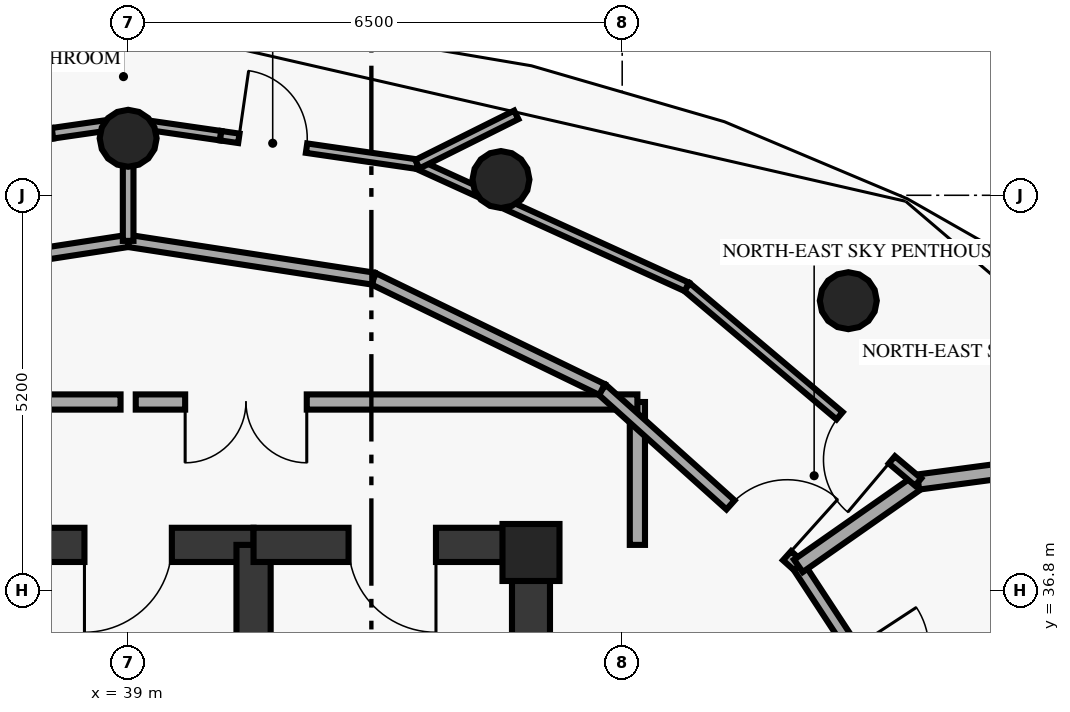
"""IFC4 building model, lengths in metres.
Left out: names, types, materials, properties, quantities, classifications, styles, units other than length and angle.
Written with IfcOpenShell. Run it as: python <this file> out.ifc"""

import sys

from ifc_helpers import new_model, si_unit, direction, frame, frame_2d, origin, origin_2d, place, context, subcontext, project, spatial, rectangle, circle, extrude, element, fill, save


model = new_model("IFC4")
c1 = context("Model", 3, precision=1e-05, world=origin(), true_north=direction((0.0, 1.0)))
c2 = subcontext(c1, "Body", "Model", "MODEL_VIEW")
j1 = project(units=[si_unit("LENGTHUNIT", "METRE"), si_unit("PLANEANGLEUNIT", "RADIAN")], contexts=[c1])
p1 = place(None, origin())
s1 = spatial("IfcSite", under=j1, at=p1, CompositionType="ELEMENT")
p2 = place(p1, origin())
s2 = spatial("IfcBuilding", under=s1, at=p2, CompositionType="ELEMENT")
p3 = place(p2, frame((0.0, 0.0, 255.6)))
s3 = spatial("IfcBuildingStorey", under=s2, at=p3, CompositionType="ELEMENT", Elevation=255.6)
p4 = place(p3, frame((44.3, 37.3, 0.0), z_axis=(0.0, 0.0, 1.0), x_axis=(1.0, 0.0, 0.0)))
e1 = element("IfcColumn", 1, at=p4, inside=s3, PredefinedType="PILASTER", context=c2, shape_type="SweptSolid", body=[
    extrude(rectangle(XDim=0.75, YDim=0.75, at=origin_2d()), origin(), (0.0, 0.0, 1.0), 3.54),
])
for number, where, z_axis, x_axis in (
    (2, (48.475, 40.613, 0.0), (0.0, 0.0, 1.0), (1.0, 0.0, 0.0)),
    (3, (43.905, 42.207, 0.0), (0.0, 0.0, 1.0), (1.0, 0.0, 0.0)),
    (4, (39.0, 42.75, 0.0), (0.0, 0.0, 1.0), (1.0, 0.0, 0.0)),
):
    element("IfcColumn", number, at=place(p3, frame(where, z_axis=z_axis, x_axis=x_axis)), inside=s3, PredefinedType="COLUMN", context=c2, shape_type="SweptSolid", body=[
        extrude(circle(Radius=0.375, at=origin_2d()), origin(), (0.0, 0.0, 1.0), 3.54),
    ])
p5 = place(p3, frame((44.3, 29.05, 0.0), z_axis=(0.0, 0.0, 1.0), x_axis=(0.0, 1.0, 0.0)))
e5 = element("IfcWall", 5, at=p5, inside=s3, PredefinedType="SHEAR", context=c2, shape_type="SweptSolid", body=[
    extrude(rectangle(XDim=8.35, YDim=0.5, at=frame_2d((4.175, 0.0))), origin(), (0.0, 0.0, 1.0), 3.54),
])
p6 = place(p3, frame((40.65, 37.4, 0.0), z_axis=(0.0, 0.0, 1.0), x_axis=(-1.0, 0.0, 0.0)))
e6 = element("IfcWall", 6, at=p6, inside=s3, PredefinedType="SHEAR", context=c2, shape_type="SweptSolid", body=[
    extrude(rectangle(XDim=3.3, YDim=0.45, at=frame_2d((1.65, 0.0))), origin(), (0.0, 0.0, 1.0), 3.54),
])
p7 = place(p6, frame((1.075, 0.0, 0.0)))
e7 = element("IfcOpeningElement", 7, at=p7, cuts=e6, PredefinedType="OPENING", context=c2, shape_type="SweptSolid", body=[
    extrude(rectangle(XDim=1.15, YDim=2.15, at=frame_2d((0.575, 1.075))), frame((0.0, 0.235, 0.0), z_axis=(0.0, -1.0, 0.0), x_axis=(1.0, 0.0, 0.0)), (0.0, 0.0, 1.0), 0.47),
])
p8 = place(p3, frame((40.65, 29.05, 0.0), z_axis=(0.0, 0.0, 1.0), x_axis=(0.0, 1.0, 0.0)))
e8 = element("IfcWall", 8, at=p8, inside=s3, PredefinedType="SHEAR", context=c2, shape_type="SweptSolid", body=[
    extrude(rectangle(XDim=8.35, YDim=0.45, at=frame_2d((4.175, 0.0))), origin(), (0.0, 0.0, 1.0), 3.54),
])
p9 = place(p3, frame((44.3, 37.4, 0.0), z_axis=(0.0, 0.0, 1.0), x_axis=(-1.0, 0.0, 0.0)))
e9 = element("IfcWall", 9, at=p9, inside=s3, PredefinedType="SHEAR", context=c2, shape_type="SweptSolid", body=[
    extrude(rectangle(XDim=3.65, YDim=0.45, at=frame_2d((1.825, 0.0))), origin(), (0.0, 0.0, 1.0), 3.54),
])
p10 = place(p9, frame((1.25, 0.0, 0.0)))
e10 = element("IfcOpeningElement", 10, at=p10, cuts=e9, PredefinedType="OPENING", context=c2, shape_type="SweptSolid", body=[
    extrude(rectangle(XDim=1.15, YDim=2.15, at=frame_2d((0.575, 1.075))), frame((0.0, 0.235, 0.0), z_axis=(0.0, -1.0, 0.0), x_axis=(1.0, 0.0, 0.0)), (0.0, 0.0, 1.0), 0.47),
])
p11 = place(p3, frame((45.7, 37.4, 0.0), z_axis=(0.0, 0.0, 1.0), x_axis=(0.0, 1.0, 0.0)))
e11 = element("IfcWall", 11, at=p11, inside=s3, PredefinedType="SOLIDWALL", context=c2, shape_type="SweptSolid", body=[
    extrude(rectangle(XDim=1.88, YDim=0.2, at=frame_2d((0.94, 0.0))), origin(), (0.0, 0.0, 1.0), 3.54),
])
p12 = place(p3, frame((38.9, 39.28, 0.0), z_axis=(0.0, 0.0, 1.0), x_axis=(-1.0, 0.0, 0.0)))
e12 = element("IfcWall", 12, at=p12, inside=s3, PredefinedType="SOLIDWALL", context=c2, shape_type="SweptSolid", body=[
    extrude(rectangle(XDim=5.2, YDim=0.2, at=frame_2d((2.6, 0.0))), origin(), (0.0, 0.0, 1.0), 3.54),
])
p13 = place(p12, frame((1.216, 0.0, 0.0)))
e13 = element("IfcOpeningElement", 13, at=p13, cuts=e12, PredefinedType="OPENING", context=c2, shape_type="SweptSolid", body=[
    extrude(rectangle(XDim=1.6, YDim=2.2, at=frame_2d((0.8, 1.1))), frame((0.0, 0.11, 0.0), z_axis=(0.0, -1.0, 0.0), x_axis=(1.0, 0.0, 0.0)), (0.0, 0.0, 1.0), 0.22),
])
p14 = place(p3, frame((45.7, 39.28, 0.0), z_axis=(0.0, 0.0, 1.0), x_axis=(-1.0, 0.0, 0.0)))
e14 = element("IfcWall", 14, at=p14, inside=s3, PredefinedType="SOLIDWALL", context=c2, shape_type="SweptSolid", body=[
    extrude(rectangle(XDim=6.6, YDim=0.2, at=frame_2d((3.3, 0.0))), origin(), (0.0, 0.0, 1.0), 3.54),
])
p15 = place(p14, frame((4.35, 0.0, 0.0)))
e15 = element("IfcOpeningElement", 15, at=p15, cuts=e14, PredefinedType="OPENING", context=c2, shape_type="SweptSolid", body=[
    extrude(rectangle(XDim=1.6, YDim=2.2, at=frame_2d((0.8, 1.1))), frame((0.0, 0.11, 0.0), z_axis=(0.0, -1.0, 0.0), x_axis=(1.0, 0.0, 0.0)), (0.0, 0.0, 1.0), 0.22),
])
p16 = place(p3, frame((47.818, 37.124, 0.0), z_axis=(0.0, 0.0, 1.0), x_axis=(0.547980633713, -0.836491019124, 0.0)))
e16 = element("IfcWall", 16, at=p16, inside=s3, PredefinedType="PARTITIONING", context=c2, shape_type="SweptSolid", body=[
    extrude(rectangle(XDim=3.615, YDim=0.16, at=frame_2d((1.808, 0.0))), origin(), (0.0, 0.0, 1.0), 3.54),
])
p17 = place(p16, frame((1.308, 0.0, 0.0)))
e17 = element("IfcOpeningElement", 17, at=p17, cuts=e16, PredefinedType="OPENING", context=c2, shape_type="SweptSolid", body=[
    extrude(rectangle(XDim=1.0, YDim=2.15, at=frame_2d((0.5, 1.075))), frame((0.0, 0.09, 0.0), z_axis=(0.0, -1.0, 0.0), x_axis=(1.0, 0.0, 0.0)), (0.0, 0.0, 1.0), 0.18),
])
p18 = place(p3, frame((45.235, 39.444, 0.0), z_axis=(0.0, 0.0, 1.0), x_axis=(0.743958104357, -0.668226263299, 0.0)))
e18 = element("IfcWall", 18, at=p18, inside=s3, PredefinedType="PARTITIONING", context=c2, shape_type="SweptSolid", body=[
    extrude(rectangle(XDim=3.472, YDim=0.16, at=frame_2d((1.736, 0.0))), origin(), (0.0, 0.0, 1.0), 3.54),
])
p19 = place(p18, frame((2.272, 0.0, 0.0)))
e19 = element("IfcOpeningElement", 19, at=p19, cuts=e18, PredefinedType="OPENING", context=c2, shape_type="SweptSolid", body=[
    extrude(rectangle(XDim=1.0, YDim=2.15, at=frame_2d((0.5, 1.075))), frame((0.0, 0.09, 0.0), z_axis=(0.0, -1.0, 0.0), x_axis=(1.0, 0.0, 0.0)), (0.0, 0.0, 1.0), 0.18),
])
p20 = place(p3, frame((45.235, 39.444, 0.0), z_axis=(0.0, 0.0, 1.0), x_axis=(-0.899751550897, 0.436402505329, 0.0)))
e20 = element("IfcWall", 20, at=p20, inside=s3, PredefinedType="PARTITIONING", context=c2, shape_type="SweptSolid", body=[
    extrude(rectangle(XDim=3.343, YDim=0.16, at=frame_2d((1.672, 0.0))), origin(), (0.0, 0.0, 1.0), 3.54),
])
for number, where, z_axis, x_axis in (
    (21, (42.227, 40.903, 0.0), (0.0, 0.0, 1.0), (-0.988, 0.152, 0.0)),
    (22, (39.0, 41.4, 0.0), (0.0, 0.0, 1.0), (-0.988, -0.152, 0.0)),
):
    element("IfcWall", number, at=place(p3, frame(where, z_axis=z_axis, x_axis=x_axis)), inside=s3, PredefinedType="PARTITIONING", context=c2, shape_type="SweptSolid", body=[
        extrude(rectangle(XDim=3.265, YDim=0.16, at=frame_2d((1.633, 0.0))), origin(), (0.0, 0.0, 1.0), 3.54),
    ])
p21 = place(p3, frame((47.818, 37.124, 0.0), z_axis=(0.0, 0.0, 1.0), x_axis=(0.819261732585, 0.573419753341, 0.0)))
e23 = element("IfcWall", 23, at=p21, inside=s3, PredefinedType="PARTITIONING", context=c2, shape_type="SweptSolid", body=[
    extrude(rectangle(XDim=1.924, YDim=0.2, at=frame_2d((0.962, 0.0))), origin(), (0.0, 0.0, 1.0), 3.54),
])
p22 = place(p3, frame((49.394, 38.227, 0.0), z_axis=(0.0, 0.0, 1.0), x_axis=(0.991241562349, 0.13206121714, 0.0)))
e24 = element("IfcWall", 24, at=p22, inside=s3, PredefinedType="PARTITIONING", context=c2, shape_type="SweptSolid", body=[
    extrude(rectangle(XDim=3.588, YDim=0.2, at=frame_2d((1.794, 0.0))), origin(), (0.0, 0.0, 1.0), 3.54),
])
p23 = place(p3, frame((46.35, 40.795, 0.0), z_axis=(0.0, 0.0, 1.0), x_axis=(0.764348134159, -0.644803791713, 0.0)))
e25 = element("IfcWall", 25, at=p23, inside=s3, PredefinedType="PARTITIONING", context=c2, shape_type="SweptSolid", body=[
    extrude(rectangle(XDim=3.982, YDim=0.125, at=frame_2d((1.991, 0.0))), origin(), (0.0, 0.0, 1.0), 3.54),
])
p24 = place(p23, frame((2.63, 0.0, 0.0)))
e26 = element("IfcOpeningElement", 26, at=p24, cuts=e25, PredefinedType="OPENING", context=c2, shape_type="SweptSolid", body=[
    extrude(rectangle(XDim=0.9, YDim=2.1, at=frame_2d((0.45, 1.05))), frame((0.0, 0.073, 0.0), z_axis=(0.0, -1.0, 0.0), x_axis=(1.0, 0.0, 0.0)), (0.0, 0.0, 1.0), 0.145),
])
p25 = place(p3, frame((46.35, 40.795, 0.0), z_axis=(0.0, 0.0, 1.0), x_axis=(-0.910117326054, 0.414350639938, 0.0)))
e27 = element("IfcWall", 27, at=p25, inside=s3, PredefinedType="PARTITIONING", context=c2, shape_type="SweptSolid", body=[
    extrude(rectangle(XDim=3.895, YDim=0.125, at=frame_2d((1.948, 0.0))), origin(), (0.0, 0.0, 1.0), 3.54),
])
p26 = place(p3, frame((39.0, 42.96, 0.0), z_axis=(0.0, 0.0, 1.0), x_axis=(0.989701809114, -0.143144434177, 0.0)))
e28 = element("IfcWall", 28, at=p26, inside=s3, PredefinedType="PARTITIONING", context=c2, shape_type="SweptSolid", body=[
    extrude(rectangle(XDim=1.23, YDim=0.125, at=frame_2d((0.615, 0.0))), origin(), (0.0, 0.0, 1.0), 3.54),
])
p27 = place(p3, frame((40.217, 42.784, 0.0), z_axis=(0.0, 0.0, 1.0), x_axis=(0.989663671869, -0.143407867924, 0.0)))
e29 = element("IfcWall", 29, at=p27, inside=s3, PredefinedType="PARTITIONING", context=c2, shape_type="SweptSolid", body=[
    extrude(rectangle(XDim=2.615, YDim=0.125, at=frame_2d((1.308, 0.0))), origin(), (0.0, 0.0, 1.0), 3.0),
])
p28 = place(p27, frame((0.242, 0.0, 0.0)))
e30 = element("IfcOpeningElement", 30, at=p28, cuts=e29, PredefinedType="OPENING", context=c2, shape_type="SweptSolid", body=[
    extrude(rectangle(XDim=0.9, YDim=2.1, at=frame_2d((0.45, 1.05))), frame((0.0, 0.073, 0.0), z_axis=(0.0, -1.0, 0.0), x_axis=(1.0, 0.0, 0.0)), (0.0, 0.0, 1.0), 0.145),
])
p29 = place(p3, frame((34.933, 42.371, 0.0), z_axis=(0.0, 0.0, 1.0), x_axis=(0.98967063222, 0.143359826038, 0.0)))
e31 = element("IfcWall", 31, at=p29, inside=s3, PredefinedType="PARTITIONING", context=c2, shape_type="SweptSolid", body=[
    extrude(rectangle(XDim=3.103, YDim=0.14, at=frame_2d((1.551, 0.0))), origin(), (0.0, 0.0, 1.0), 3.0),
])
p30 = place(p29, frame((1.762, 0.0, 0.0)))
e32 = element("IfcOpeningElement", 32, at=p30, cuts=e31, PredefinedType="OPENING", context=c2, shape_type="SweptSolid", body=[
    extrude(rectangle(XDim=0.85, YDim=2.1, at=frame_2d((0.425, 1.05))), frame((0.0, 0.08, 0.0), z_axis=(0.0, -1.0, 0.0), x_axis=(1.0, 0.0, 0.0)), (0.0, 0.0, 1.0), 0.16),
])
p31 = place(p3, frame((38.004, 42.816, 0.0), z_axis=(0.0, 0.0, 1.0), x_axis=(0.989705462513, 0.143119172275, 0.0)))
e33 = element("IfcWall", 33, at=p31, inside=s3, PredefinedType="PARTITIONING", context=c2, shape_type="SweptSolid", body=[
    extrude(rectangle(XDim=1.006, YDim=0.14, at=frame_2d((0.503, 0.0))), origin(), (0.0, 0.0, 1.0), 3.54),
])
p32 = place(p3, frame((39.0, 41.4, 0.0), z_axis=(0.0, 0.0, 1.0), x_axis=(0.0, 1.0, 0.0)))
e34 = element("IfcWall", 34, at=p32, inside=s3, PredefinedType="PARTITIONING", context=c2, shape_type="SweptSolid", body=[
    extrude(rectangle(XDim=1.56, YDim=0.14, at=frame_2d((0.78, 0.0))), origin(), (0.0, 0.0, 1.0), 3.54),
])
p33 = place(p3, frame((42.805, 42.409, 0.0), z_axis=(0.0, 0.0, 1.0), x_axis=(0.894796289478, 0.446474635714, 0.0)))
e35 = element("IfcWall", 35, at=p33, inside=s3, PredefinedType="PARTITIONING", context=c2, shape_type="SweptSolid", body=[
    extrude(rectangle(XDim=1.454, YDim=0.125, at=frame_2d((0.727, 0.0))), origin(), (0.0, 0.0, 1.0), 3.54),
])
p34 = place(p7, origin())
e36 = element("IfcDoor", 36, at=p34, inside=s3, OperationType="SINGLE_SWING_RIGHT", PredefinedType="DOOR", context=c2, shape_type="SweptSolid", body=[
    extrude(rectangle(XDim=1.15, YDim=2.15, at=frame_2d((0.575, 1.075))), frame((0.0, 0.025, 0.0), z_axis=(0.0, -1.0, 0.0), x_axis=(1.0, 0.0, 0.0)), (0.0, 0.0, 1.0), 0.05),
])
fill(e7, e36)
p35 = place(p10, origin())
e37 = element("IfcDoor", 37, at=p35, inside=s3, OperationType="SINGLE_SWING_LEFT", PredefinedType="DOOR", context=c2, shape_type="SweptSolid", body=[
    extrude(rectangle(XDim=1.15, YDim=2.15, at=frame_2d((0.575, 1.075))), frame((0.0, 0.025, 0.0), z_axis=(0.0, -1.0, 0.0), x_axis=(1.0, 0.0, 0.0)), (0.0, 0.0, 1.0), 0.05),
])
fill(e10, e37)
p36 = place(p15, origin())
e38 = element("IfcDoor", 38, at=p36, inside=s3, OperationType="DOUBLE_DOOR_SINGLE_SWING", PredefinedType="DOOR", context=c2, shape_type="SweptSolid", body=[
    extrude(rectangle(XDim=1.6, YDim=2.2, at=frame_2d((0.8, 1.1))), frame((0.0, 0.025, 0.0), z_axis=(0.0, -1.0, 0.0), x_axis=(1.0, 0.0, 0.0)), (0.0, 0.0, 1.0), 0.05),
])
fill(e15, e38)
p37 = place(p19, origin())
e39 = element("IfcDoor", 39, at=p37, inside=s3, OperationType="SINGLE_SWING_RIGHT", PredefinedType="DOOR", context=c2, shape_type="SweptSolid", body=[
    extrude(rectangle(XDim=1.0, YDim=2.15, at=frame_2d((0.5, 1.075))), frame((0.0, 0.025, 0.0), z_axis=(0.0, -1.0, 0.0), x_axis=(1.0, 0.0, 0.0)), (0.0, 0.0, 1.0), 0.05),
])
fill(e19, e39)
p38 = place(p24, origin())
e40 = element("IfcDoor", 40, at=p38, inside=s3, OperationType="SINGLE_SWING_RIGHT", PredefinedType="DOOR", context=c2, shape_type="SweptSolid", body=[
    extrude(rectangle(XDim=0.9, YDim=2.1, at=frame_2d((0.45, 1.05))), frame((0.0, 0.025, 0.0), z_axis=(0.0, -1.0, 0.0), x_axis=(1.0, 0.0, 0.0)), (0.0, 0.0, 1.0), 0.05),
])
fill(e26, e40)
p39 = place(p28, origin())
e41 = element("IfcDoor", 41, at=p39, inside=s3, OperationType="SINGLE_SWING_LEFT", PredefinedType="DOOR", context=c2, shape_type="SweptSolid", body=[
    extrude(rectangle(XDim=0.9, YDim=2.1, at=frame_2d((0.45, 1.05))), frame((0.0, 0.025, 0.0), z_axis=(0.0, -1.0, 0.0), x_axis=(1.0, 0.0, 0.0)), (0.0, 0.0, 1.0), 0.05),
])
fill(e30, e41)
save(model, sys.argv[1])
